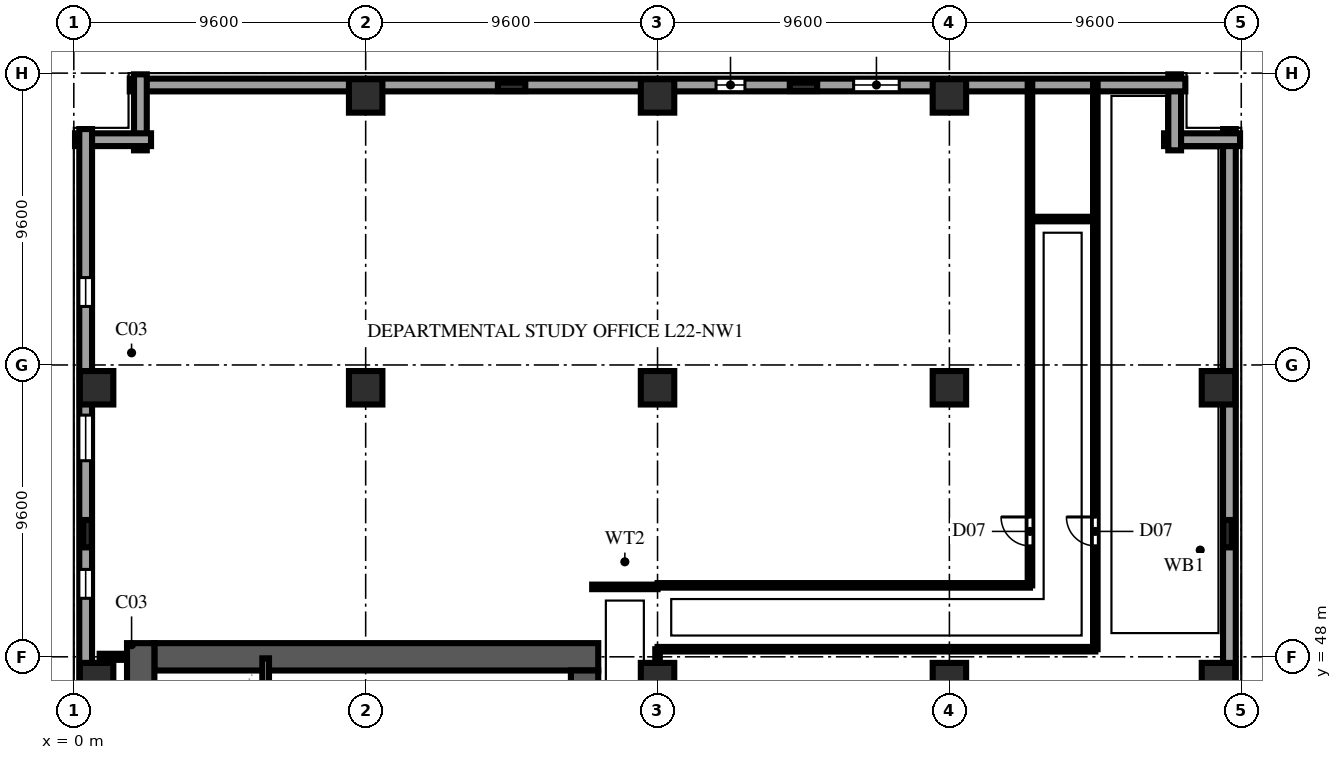
"""IFC4 building model, lengths in metres.
Left out: names, types, materials, properties, quantities, classifications, styles, units other than length and angle.
Written with IfcOpenShell. Run it as: python <this file> out.ifc"""

import sys

from ifc_helpers import new_model, si_unit, direction, frame, frame_2d, origin, origin_2d, place, context, subcontext, project, spatial, rectangle, extrude, element, fill, save


model = new_model("IFC4")
c1 = context("Model", 3, precision=1e-05, world=origin(), true_north=direction((0.0, 1.0)))
c2 = subcontext(c1, "Body", "Model", "MODEL_VIEW")
j1 = project(units=[si_unit("LENGTHUNIT", "METRE"), si_unit("PLANEANGLEUNIT", "RADIAN")], contexts=[c1])
p1 = place(None, origin())
s1 = spatial("IfcSite", under=j1, at=p1, CompositionType="ELEMENT")
p2 = place(p1, origin())
s2 = spatial("IfcBuilding", under=s1, at=p2, CompositionType="ELEMENT")
p3 = place(p2, frame((0.0, 0.0, 88.8)))
s3 = spatial("IfcBuildingStorey", under=s2, at=p3, CompositionType="ELEMENT", Elevation=88.8)
p4 = place(p3, frame((2.65, 48.0, 0.0), z_axis=(0.0, 0.0, 1.0), x_axis=(1.0, 0.0, 0.0)))
e1 = element("IfcWall", 1, at=p4, inside=s3, PredefinedType="SHEAR", context=c2, shape_type="SweptSolid", body=[
    extrude(rectangle(XDim=14.6, YDim=0.9, at=frame_2d((7.3, 0.0))), origin(), (0.0, 0.0, 1.0), 3.54),
])
p5 = place(p3, frame((2.2, 9.15, 0.0), z_axis=(0.0, 0.0, 1.0), x_axis=(0.0, 1.0, 0.0)))
e2 = element("IfcWall", 2, at=p5, inside=s3, PredefinedType="SHEAR", context=c2, shape_type="SweptSolid", body=[
    extrude(rectangle(XDim=39.3, YDim=0.9, at=frame_2d((19.65, 0.0))), origin(), (0.0, 0.0, 1.0), 3.54),
])
p6 = place(p3, frame((16.8, 36.4, 0.0), z_axis=(0.0, 0.0, 1.0), x_axis=(0.0, 1.0, 0.0)))
e3 = element("IfcWall", 3, at=p6, inside=s3, PredefinedType="SHEAR", context=c2, shape_type="SweptSolid", body=[
    extrude(rectangle(XDim=11.15, YDim=0.9, at=frame_2d((5.575, 0.0))), origin(), (0.0, 0.0, 1.0), 3.54),
])
p7 = place(p6, frame((9.2, 0.0, 0.0)))
e4 = element("IfcOpeningElement", 4, at=p7, cuts=e3, PredefinedType="OPENING", context=c2, shape_type="SweptSolid", body=[
    extrude(rectangle(XDim=0.95, YDim=2.15, at=frame_2d((0.475, 1.075))), frame((0.0, 0.462, 0.0), z_axis=(0.0, -1.0, 0.0), x_axis=(1.0, 0.0, 0.0)), (0.0, 0.0, 1.0), 0.924),
])
for number, where, z_axis, x_axis in (
    (5, (0.75, 47.25, 0.0), (0.0, 0.0, 1.0), (1.0, 0.0, 0.0)),
    (6, (0.75, 56.85, 0.0), (0.0, 0.0, 1.0), (1.0, 0.0, 0.0)),
    (7, (9.6, 56.85, 0.0), (0.0, 0.0, 1.0), (1.0, 0.0, 0.0)),
    (8, (9.6, 66.45, 0.0), (0.0, 0.0, 1.0), (1.0, 0.0, 0.0)),
    (9, (19.2, 47.25, 0.0), (0.0, 0.0, 1.0), (1.0, 0.0, 0.0)),
    (10, (19.2, 56.85, 0.0), (0.0, 0.0, 1.0), (1.0, 0.0, 0.0)),
    (11, (19.2, 66.45, 0.0), (0.0, 0.0, 1.0), (1.0, 0.0, 0.0)),
    (12, (28.8, 47.25, 0.0), (0.0, 0.0, 1.0), (1.0, 0.0, 0.0)),
    (13, (28.8, 56.85, 0.0), (0.0, 0.0, 1.0), (1.0, 0.0, 0.0)),
    (14, (28.8, 66.45, 0.0), (0.0, 0.0, 1.0), (1.0, 0.0, 0.0)),
    (15, (37.65, 47.25, 0.0), (0.0, 0.0, 1.0), (1.0, 0.0, 0.0)),
    (16, (37.65, 56.85, 0.0), (0.0, 0.0, 1.0), (1.0, 0.0, 0.0)),
):
    element("IfcColumn", number, at=place(p3, frame(where, z_axis=z_axis, x_axis=x_axis)), inside=s3, PredefinedType="COLUMN", context=c2, shape_type="SweptSolid", body=[
        extrude(rectangle(XDim=1.1, YDim=1.1, at=origin_2d()), origin(), (0.0, 0.0, 1.0), 3.8),
    ])
for number, where, z_axis, x_axis in (
    (17, (0.45, 52.05, 0.0), (0.0, 0.0, 1.0), (0.0, 1.0, 0.0)),
    (18, (14.4, 66.75, 0.0), (0.0, 0.0, 1.0), (1.0, 0.0, 0.0)),
    (19, (24.0, 66.75, 0.0), (0.0, 0.0, 1.0), (1.0, 0.0, 0.0)),
    (20, (37.95, 52.05, 0.0), (0.0, 0.0, 1.0), (0.0, 1.0, 0.0)),
):
    element("IfcColumn", number, at=place(p3, frame(where, z_axis=z_axis, x_axis=x_axis)), inside=s3, PredefinedType="PILASTER", context=c2, shape_type="SweptSolid", body=[
        extrude(rectangle(XDim=0.9, YDim=0.28, at=origin_2d()), origin(), (0.0, 0.0, 1.0), 3.8),
    ])
p8 = place(p3, frame((38.01, 37.66, 0.0), z_axis=(0.0, 0.0, 1.0), x_axis=(0.0, 1.0, 0.0)))
e21 = element("IfcWall", 21, at=p8, inside=s3, PredefinedType="SOLIDWALL", context=c2, shape_type="SweptSolid", body=[
    extrude(rectangle(XDim=27.7, YDim=0.42, at=frame_2d((13.85, 0.0))), origin(), (0.0, 0.0, 1.0), 3.54),
])
for number, where, z_axis, x_axis in (
    (22, (38.36, 65.01, 0.0), (0.0, 0.0, 1.0), (-1.0, 0.0, 0.0)),
    (23, (36.21, 64.66, 0.0), (0.0, 0.0, 1.0), (0.0, 1.0, 0.0)),
):
    element("IfcWall", number, at=place(p3, frame(where, z_axis=z_axis, x_axis=x_axis)), inside=s3, PredefinedType="SOLIDWALL", context=c2, shape_type="SweptSolid", body=[
        extrude(rectangle(XDim=2.5, YDim=0.42, at=frame_2d((1.25, 0.0))), origin(), (0.0, 0.0, 1.0), 3.54),
    ])
p9 = place(p3, frame((36.56, 66.81, 0.0), z_axis=(0.0, 0.0, 1.0), x_axis=(-1.0, 0.0, 0.0)))
e24 = element("IfcWall", 24, at=p9, inside=s3, PredefinedType="SOLIDWALL", context=c2, shape_type="SweptSolid", body=[
    extrude(rectangle(XDim=34.72, YDim=0.42, at=frame_2d((17.36, 0.0))), origin(), (0.0, 0.0, 1.0), 3.54),
])
p10 = place(p9, frame((9.41, 0.0, 0.9)))
e25 = element("IfcOpeningElement", 25, at=p10, cuts=e24, PredefinedType="OPENING", context=c2, shape_type="SweptSolid", body=[
    extrude(rectangle(XDim=1.5, YDim=1.85, at=frame_2d((0.75, 0.925))), frame((0.0, 0.222, 0.0), z_axis=(0.0, -1.0, 0.0), x_axis=(1.0, 0.0, 0.0)), (0.0, 0.0, 1.0), 0.444),
])
p11 = place(p9, frame((14.485, 0.0, 0.9)))
e26 = element("IfcOpeningElement", 26, at=p11, cuts=e24, PredefinedType="OPENING", context=c2, shape_type="SweptSolid", body=[
    extrude(rectangle(XDim=0.95, YDim=1.85, at=frame_2d((0.475, 0.925))), frame((0.0, 0.222, 0.0), z_axis=(0.0, -1.0, 0.0), x_axis=(1.0, 0.0, 0.0)), (0.0, 0.0, 1.0), 0.444),
])
for number, where, z_axis, x_axis in (
    (27, (2.19, 67.16, 0.0), (0.0, 0.0, 1.0), (0.0, -1.0, 0.0)),
    (28, (2.54, 65.01, 0.0), (0.0, 0.0, 1.0), (-1.0, 0.0, 0.0)),
):
    element("IfcWall", number, at=place(p3, frame(where, z_axis=z_axis, x_axis=x_axis)), inside=s3, PredefinedType="SOLIDWALL", context=c2, shape_type="SweptSolid", body=[
        extrude(rectangle(XDim=2.5, YDim=0.42, at=frame_2d((1.25, 0.0))), origin(), (0.0, 0.0, 1.0), 3.54),
    ])
p12 = place(p3, frame((0.39, 65.36, 0.0), z_axis=(0.0, 0.0, 1.0), x_axis=(0.0, -1.0, 0.0)))
e29 = element("IfcWall", 29, at=p12, inside=s3, PredefinedType="SOLIDWALL", context=c2, shape_type="SweptSolid", body=[
    extrude(rectangle(XDim=63.52, YDim=0.42, at=frame_2d((31.76, 0.0))), origin(), (0.0, 0.0, 1.0), 3.54),
])
p13 = place(p12, frame((4.885, 0.0, 0.9)))
e30 = element("IfcOpeningElement", 30, at=p13, cuts=e29, PredefinedType="OPENING", context=c2, shape_type="SweptSolid", body=[
    extrude(rectangle(XDim=0.95, YDim=1.85, at=frame_2d((0.475, 0.925))), frame((0.0, 0.222, 0.0), z_axis=(0.0, -1.0, 0.0), x_axis=(1.0, 0.0, 0.0)), (0.0, 0.0, 1.0), 0.444),
])
p14 = place(p12, frame((9.41, 0.0, 0.9)))
e31 = element("IfcOpeningElement", 31, at=p14, cuts=e29, PredefinedType="OPENING", context=c2, shape_type="SweptSolid", body=[
    extrude(rectangle(XDim=1.5, YDim=1.85, at=frame_2d((0.75, 0.925))), frame((0.0, 0.222, 0.0), z_axis=(0.0, -1.0, 0.0), x_axis=(1.0, 0.0, 0.0)), (0.0, 0.0, 1.0), 0.444),
])
p15 = place(p12, frame((14.485, 0.0, 0.9)))
e32 = element("IfcOpeningElement", 32, at=p15, cuts=e29, PredefinedType="OPENING", context=c2, shape_type="SweptSolid", body=[
    extrude(rectangle(XDim=0.95, YDim=1.85, at=frame_2d((0.475, 0.925))), frame((0.0, 0.222, 0.0), z_axis=(0.0, -1.0, 0.0), x_axis=(1.0, 0.0, 0.0)), (0.0, 0.0, 1.0), 0.444),
])
p16 = place(p12, frame((19.01, 0.0, 0.9)))
e33 = element("IfcOpeningElement", 33, at=p16, cuts=e29, PredefinedType="OPENING", context=c2, shape_type="SweptSolid", body=[
    extrude(rectangle(XDim=1.5, YDim=1.85, at=frame_2d((0.75, 0.925))), frame((0.0, 0.222, 0.0), z_axis=(0.0, -1.0, 0.0), x_axis=(1.0, 0.0, 0.0)), (0.0, 0.0, 1.0), 0.444),
])
p17 = place(p12, frame((24.085, 0.0, 0.9)))
e34 = element("IfcOpeningElement", 34, at=p17, cuts=e29, PredefinedType="OPENING", context=c2, shape_type="SweptSolid", body=[
    extrude(rectangle(XDim=0.95, YDim=1.85, at=frame_2d((0.475, 0.925))), frame((0.0, 0.222, 0.0), z_axis=(0.0, -1.0, 0.0), x_axis=(1.0, 0.0, 0.0)), (0.0, 0.0, 1.0), 0.444),
])
p18 = place(p12, frame((28.61, 0.0, 0.9)))
e35 = element("IfcOpeningElement", 35, at=p18, cuts=e29, PredefinedType="OPENING", context=c2, shape_type="SweptSolid", body=[
    extrude(rectangle(XDim=1.5, YDim=1.85, at=frame_2d((0.75, 0.925))), frame((0.0, 0.222, 0.0), z_axis=(0.0, -1.0, 0.0), x_axis=(1.0, 0.0, 0.0)), (0.0, 0.0, 1.0), 0.444),
])
p19 = place(p12, frame((33.685, 0.0, 0.9)))
e36 = element("IfcOpeningElement", 36, at=p19, cuts=e29, PredefinedType="OPENING", context=c2, shape_type="SweptSolid", body=[
    extrude(rectangle(XDim=0.95, YDim=1.85, at=frame_2d((0.475, 0.925))), frame((0.0, 0.222, 0.0), z_axis=(0.0, -1.0, 0.0), x_axis=(1.0, 0.0, 0.0)), (0.0, 0.0, 1.0), 0.444),
])
p20 = place(p12, frame((38.21, 0.0, 0.9)))
e37 = element("IfcOpeningElement", 37, at=p20, cuts=e29, PredefinedType="OPENING", context=c2, shape_type="SweptSolid", body=[
    extrude(rectangle(XDim=1.5, YDim=1.85, at=frame_2d((0.75, 0.925))), frame((0.0, 0.222, 0.0), z_axis=(0.0, -1.0, 0.0), x_axis=(1.0, 0.0, 0.0)), (0.0, 0.0, 1.0), 0.444),
])
p21 = place(p12, frame((43.285, 0.0, 0.9)))
e38 = element("IfcOpeningElement", 38, at=p21, cuts=e29, PredefinedType="OPENING", context=c2, shape_type="SweptSolid", body=[
    extrude(rectangle(XDim=0.95, YDim=1.85, at=frame_2d((0.475, 0.925))), frame((0.0, 0.222, 0.0), z_axis=(0.0, -1.0, 0.0), x_axis=(1.0, 0.0, 0.0)), (0.0, 0.0, 1.0), 0.444),
])
p22 = place(p12, frame((47.81, 0.0, 0.9)))
e39 = element("IfcOpeningElement", 39, at=p22, cuts=e29, PredefinedType="OPENING", context=c2, shape_type="SweptSolid", body=[
    extrude(rectangle(XDim=1.5, YDim=1.85, at=frame_2d((0.75, 0.925))), frame((0.0, 0.222, 0.0), z_axis=(0.0, -1.0, 0.0), x_axis=(1.0, 0.0, 0.0)), (0.0, 0.0, 1.0), 0.444),
])
p23 = place(p12, frame((52.885, 0.0, 0.9)))
e40 = element("IfcOpeningElement", 40, at=p23, cuts=e29, PredefinedType="OPENING", context=c2, shape_type="SweptSolid", body=[
    extrude(rectangle(XDim=0.95, YDim=1.85, at=frame_2d((0.475, 0.925))), frame((0.0, 0.222, 0.0), z_axis=(0.0, -1.0, 0.0), x_axis=(1.0, 0.0, 0.0)), (0.0, 0.0, 1.0), 0.444),
])
p24 = place(p3, frame((6.31, 40.14, 0.0), z_axis=(0.0, 0.0, 1.0), x_axis=(0.0, 1.0, 0.0)))
e41 = element("IfcWall", 41, at=p24, inside=s3, PredefinedType="SOLIDWALL", context=c2, shape_type="SweptSolid", body=[
    extrude(rectangle(XDim=7.81, YDim=0.22, at=frame_2d((3.905, 0.0))), origin(), (0.0, 0.0, 1.0), 3.54),
])
p25 = place(p3, frame((0.85, 48.0, 0.0), z_axis=(0.0, 0.0, 1.0), x_axis=(1.0, 0.0, 0.0)))
e42 = element("IfcWall", 42, at=p25, inside=s3, PredefinedType="SOLIDWALL", context=c2, shape_type="SweptSolid", body=[
    extrude(rectangle(XDim=0.895, YDim=0.2, at=frame_2d((0.448, 0.0))), origin(), (0.0, 0.0, 1.0), 3.54),
])
p26 = place(p3, frame((17.05, 50.3, 0.0), z_axis=(0.0, 0.0, 1.0), x_axis=(1.0, 0.0, 0.0)))
e43 = element("IfcWall", 43, at=p26, inside=s3, PredefinedType="PARTITIONING", context=c2, shape_type="SweptSolid", body=[
    extrude(rectangle(XDim=2.15, YDim=0.15, at=frame_2d((1.075, 0.0))), origin(), (0.0, 0.0, 1.0), 3.54),
])
p27 = place(p3, frame((19.2, 35.45, 0.0), z_axis=(0.0, 0.0, 1.0), x_axis=(0.0, 1.0, 0.0)))
e44 = element("IfcWall", 44, at=p27, inside=s3, PredefinedType="PARTITIONING", context=c2, shape_type="SweptSolid", body=[
    extrude(rectangle(XDim=12.8, YDim=0.15, at=frame_2d((6.4, 0.0))), origin(), (0.0, 0.0, 1.0), 2.924),
])
p28 = place(p27, frame((6.6, 0.0, 0.0)))
e45 = element("IfcOpeningElement", 45, at=p28, cuts=e44, PredefinedType="OPENING", context=c2, shape_type="SweptSolid", body=[
    extrude(rectangle(XDim=0.95, YDim=2.15, at=frame_2d((0.475, 1.075))), frame((0.0, 0.087, 0.0), z_axis=(0.0, -1.0, 0.0), x_axis=(1.0, 0.0, 0.0)), (0.0, 0.0, 1.0), 0.174),
])
p29 = place(p3, frame((19.2, 48.25, 0.0), z_axis=(0.0, 0.0, 1.0), x_axis=(1.0, 0.0, 0.0)))
e46 = element("IfcWall", 46, at=p29, inside=s3, PredefinedType="PARTITIONING", context=c2, shape_type="SweptSolid", body=[
    extrude(rectangle(XDim=14.4, YDim=0.15, at=frame_2d((7.2, 0.0))), origin(), (0.0, 0.0, 1.0), 3.54),
])
p30 = place(p3, frame((19.2, 50.35, 0.0), z_axis=(0.0, 0.0, 1.0), x_axis=(1.0, 0.0, 0.0)))
e47 = element("IfcWall", 47, at=p30, inside=s3, PredefinedType="PARTITIONING", context=c2, shape_type="SweptSolid", body=[
    extrude(rectangle(XDim=12.25, YDim=0.15, at=frame_2d((6.125, 0.0))), origin(), (0.0, 0.0, 1.0), 3.54),
])
p31 = place(p3, frame((31.45, 62.4, 0.0), z_axis=(0.0, 0.0, 1.0), x_axis=(1.0, 0.0, 0.0)))
e48 = element("IfcWall", 48, at=p31, inside=s3, PredefinedType="PARTITIONING", context=c2, shape_type="SweptSolid", body=[
    extrude(rectangle(XDim=2.15, YDim=0.15, at=frame_2d((1.075, 0.0))), origin(), (0.0, 0.0, 1.0), 3.54),
])
p32 = place(p3, frame((33.6, 48.25, 0.0), z_axis=(0.0, 0.0, 1.0), x_axis=(0.0, 1.0, 0.0)))
e49 = element("IfcWall", 49, at=p32, inside=s3, PredefinedType="PARTITIONING", context=c2, shape_type="SweptSolid", body=[
    extrude(rectangle(XDim=18.73, YDim=0.15, at=frame_2d((9.365, 0.0))), origin(), (0.0, 0.0, 1.0), 3.54),
])
p33 = place(p32, frame((3.4, 0.0, 0.0)))
e50 = element("IfcOpeningElement", 50, at=p33, cuts=e49, PredefinedType="OPENING", context=c2, shape_type="SweptSolid", body=[
    extrude(rectangle(XDim=0.95, YDim=2.15, at=frame_2d((0.475, 1.075))), frame((0.0, 0.087, 0.0), z_axis=(0.0, -1.0, 0.0), x_axis=(1.0, 0.0, 0.0)), (0.0, 0.0, 1.0), 0.174),
])
p34 = place(p3, frame((31.45, 50.35, 0.0), z_axis=(0.0, 0.0, 1.0), x_axis=(0.0, 1.0, 0.0)))
e51 = element("IfcWall", 51, at=p34, inside=s3, PredefinedType="PARTITIONING", context=c2, shape_type="SweptSolid", body=[
    extrude(rectangle(XDim=16.63, YDim=0.15, at=frame_2d((8.315, 0.0))), origin(), (0.0, 0.0, 1.0), 3.54),
])
p35 = place(p34, frame((1.3, 0.0, 0.0)))
e52 = element("IfcOpeningElement", 52, at=p35, cuts=e51, PredefinedType="OPENING", context=c2, shape_type="SweptSolid", body=[
    extrude(rectangle(XDim=0.95, YDim=2.15, at=frame_2d((0.475, 1.075))), frame((0.0, 0.087, 0.0), z_axis=(0.0, -1.0, 0.0), x_axis=(1.0, 0.0, 0.0)), (0.0, 0.0, 1.0), 0.174),
])
p36 = place(p10, origin())
e53 = element("IfcWindow", 53, at=p36, inside=s3, PartitioningType="DOUBLE_PANEL_VERTICAL", PredefinedType="WINDOW", context=c2, shape_type="SweptSolid", body=[
    extrude(rectangle(XDim=1.5, YDim=1.85, at=frame_2d((0.75, 0.925))), frame((0.0, 0.11, 0.0), z_axis=(0.0, -1.0, 0.0), x_axis=(1.0, 0.0, 0.0)), (0.0, 0.0, 1.0), 0.06),
])
fill(e25, e53)
p37 = place(p11, origin())
e54 = element("IfcWindow", 54, at=p37, inside=s3, PartitioningType="SINGLE_PANEL", PredefinedType="WINDOW", context=c2, shape_type="SweptSolid", body=[
    extrude(rectangle(XDim=0.95, YDim=1.85, at=frame_2d((0.475, 0.925))), frame((0.0, 0.11, 0.0), z_axis=(0.0, -1.0, 0.0), x_axis=(1.0, 0.0, 0.0)), (0.0, 0.0, 1.0), 0.06),
])
fill(e26, e54)
p38 = place(p13, origin())
e55 = element("IfcWindow", 55, at=p38, inside=s3, PartitioningType="SINGLE_PANEL", PredefinedType="WINDOW", context=c2, shape_type="SweptSolid", body=[
    extrude(rectangle(XDim=0.95, YDim=1.85, at=frame_2d((0.475, 0.925))), frame((0.0, 0.11, 0.0), z_axis=(0.0, -1.0, 0.0), x_axis=(1.0, 0.0, 0.0)), (0.0, 0.0, 1.0), 0.06),
])
fill(e30, e55)
p39 = place(p14, origin())
e56 = element("IfcWindow", 56, at=p39, inside=s3, PartitioningType="DOUBLE_PANEL_VERTICAL", PredefinedType="WINDOW", context=c2, shape_type="SweptSolid", body=[
    extrude(rectangle(XDim=1.5, YDim=1.85, at=frame_2d((0.75, 0.925))), frame((0.0, 0.11, 0.0), z_axis=(0.0, -1.0, 0.0), x_axis=(1.0, 0.0, 0.0)), (0.0, 0.0, 1.0), 0.06),
])
fill(e31, e56)
p40 = place(p15, origin())
e57 = element("IfcWindow", 57, at=p40, inside=s3, PartitioningType="SINGLE_PANEL", PredefinedType="WINDOW", context=c2, shape_type="SweptSolid", body=[
    extrude(rectangle(XDim=0.95, YDim=1.85, at=frame_2d((0.475, 0.925))), frame((0.0, 0.11, 0.0), z_axis=(0.0, -1.0, 0.0), x_axis=(1.0, 0.0, 0.0)), (0.0, 0.0, 1.0), 0.06),
])
fill(e32, e57)
p41 = place(p33, origin())
e58 = element("IfcDoor", 58, at=p41, inside=s3, OperationType="SINGLE_SWING_RIGHT", PredefinedType="DOOR", context=c2, shape_type="SweptSolid", body=[
    extrude(rectangle(XDim=0.95, YDim=2.15, at=frame_2d((0.475, 1.075))), frame((0.0, 0.025, 0.0), z_axis=(0.0, -1.0, 0.0), x_axis=(1.0, 0.0, 0.0)), (0.0, 0.0, 1.0), 0.05),
])
fill(e50, e58)
p42 = place(p35, origin())
e59 = element("IfcDoor", 59, at=p42, inside=s3, OperationType="SINGLE_SWING_RIGHT", PredefinedType="DOOR", context=c2, shape_type="SweptSolid", body=[
    extrude(rectangle(XDim=0.95, YDim=2.15, at=frame_2d((0.475, 1.075))), frame((0.0, 0.025, 0.0), z_axis=(0.0, -1.0, 0.0), x_axis=(1.0, 0.0, 0.0)), (0.0, 0.0, 1.0), 0.05),
])
fill(e52, e59)
save(model, sys.argv[1])
